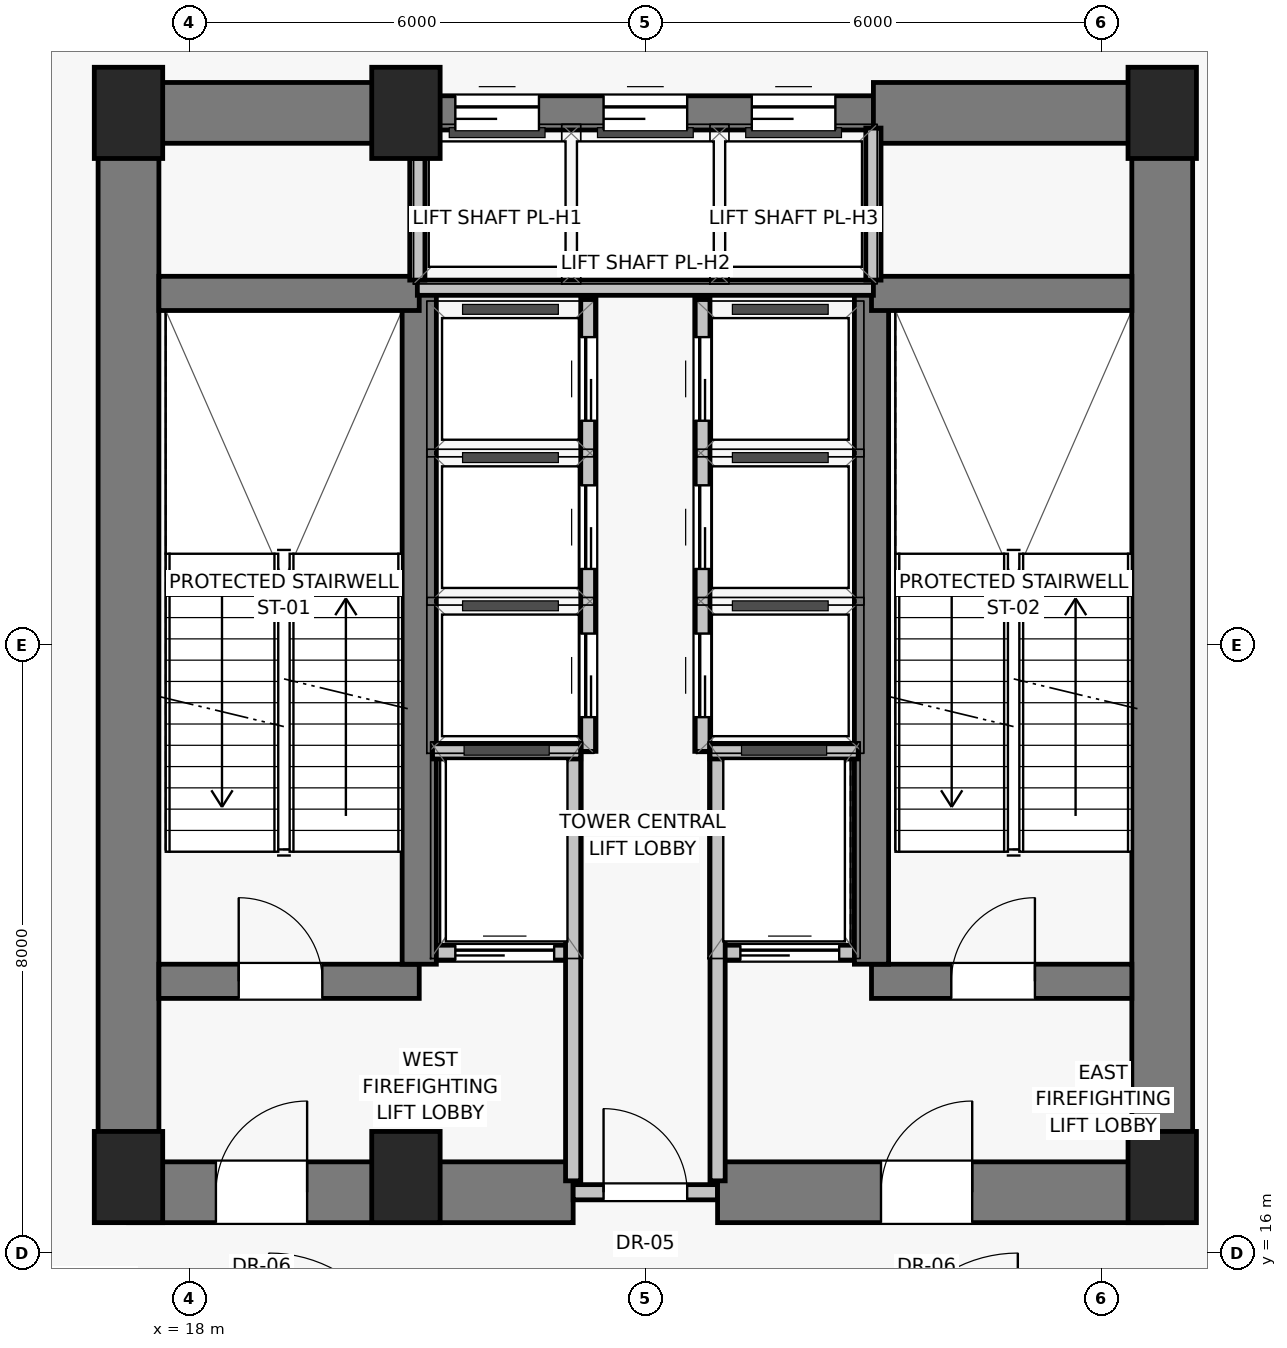
"""IFC4 building model, lengths in metres.
Left out: names, types, materials, properties, quantities, classifications, styles, units other than length and angle.
Written with IfcOpenShell. Run it as: python <this file> out.ifc"""

import sys

from ifc_helpers import new_model, si_unit, direction, frame, frame_2d, origin, origin_2d, place, context, subcontext, project, spatial, rectangle, extrude, source, transform, mapped, element, fill, save


model = new_model("IFC4")
c1 = context("Model", 3, precision=1e-05, world=origin(), true_north=direction((0.0, 1.0)))
c2 = subcontext(c1, "Body", "Model", "MODEL_VIEW")
j1 = project(units=[si_unit("LENGTHUNIT", "METRE"), si_unit("PLANEANGLEUNIT", "RADIAN")], contexts=[c1])
p1 = place(None, origin())
s1 = spatial("IfcSite", under=j1, at=p1, CompositionType="ELEMENT")
p2 = place(p1, origin())
s2 = spatial("IfcBuilding", under=s1, at=p2, CompositionType="ELEMENT")
p3 = place(p2, origin())
s3 = spatial("IfcBuildingStorey", under=s2, at=p3, CompositionType="ELEMENT", Elevation=0.0)
for number, where, z_axis, x_axis in (
    (1, (17.2, 17.0, 0.0), (0.0, 0.0, 1.0), (1.0, 0.0, 0.0)),
    (2, (20.85, 17.0, 0.0), (0.0, 0.0, 1.0), (1.0, 0.0, 0.0)),
    (3, (30.8, 17.0, 0.0), (0.0, 0.0, 1.0), (1.0, 0.0, 0.0)),
    (4, (17.2, 31.0, 0.0), (0.0, 0.0, 1.0), (1.0, 0.0, 0.0)),
    (5, (20.85, 31.0, 0.0), (0.0, 0.0, 1.0), (1.0, 0.0, 0.0)),
    (6, (30.8, 31.0, 0.0), (0.0, 0.0, 1.0), (1.0, 0.0, 0.0)),
):
    element("IfcColumn", number, at=place(p3, frame(where, z_axis=z_axis, x_axis=x_axis)), inside=s3, PredefinedType="PILASTER", context=c2, shape_type="SweptSolid", body=[
        extrude(rectangle(XDim=0.9, YDim=1.2, at=origin_2d()), origin(), (0.0, 0.0, 1.0), 5.2),
    ])
for number, where, z_axis, x_axis in (
    (7, (17.2, 16.8, 0.0), (0.0, 0.0, 1.0), (0.0, 1.0, 0.0)),
    (8, (30.8, 16.8, 0.0), (0.0, 0.0, 1.0), (0.0, 1.0, 0.0)),
):
    element("IfcWall", number, at=place(p3, frame(where, z_axis=z_axis, x_axis=x_axis)), inside=s3, PredefinedType="SHEAR", context=c2, shape_type="SweptSolid", body=[
        extrude(rectangle(XDim=14.2, YDim=0.8, at=frame_2d((7.1, 0.0))), origin(), (0.0, 0.0, 1.0), 4.9),
    ])
p4 = place(p3, frame((17.2, 16.8, 0.0), z_axis=(0.0, 0.0, 1.0), x_axis=(1.0, 0.0, 0.0)))
e9 = element("IfcWall", 9, at=p4, inside=s3, PredefinedType="SHEAR", context=c2, shape_type="SweptSolid", body=[
    extrude(rectangle(XDim=5.85, YDim=0.8, at=frame_2d((2.925, 0.0))), origin(), (0.0, 0.0, 1.0), 4.9),
])
p5 = place(p4, frame((1.15, 0.0, 0.0)))
e10 = element("IfcOpeningElement", 10, at=p5, cuts=e9, PredefinedType="OPENING", context=c2, shape_type="SweptSolid", body=[
    extrude(rectangle(XDim=1.2, YDim=2.03, at=frame_2d((0.6, 1.015))), frame((0.0, 0.41, 0.0), z_axis=(0.0, -1.0, 0.0), x_axis=(1.0, 0.0, 0.0)), (0.0, 0.0, 1.0), 0.82),
])
p6 = place(p3, frame((23.05, 16.8, 0.0), z_axis=(0.0, 0.0, 1.0), x_axis=(1.0, 0.0, 0.0)))
e11 = element("IfcWall", 11, at=p6, inside=s3, PredefinedType="SOLIDWALL", context=c2, shape_type="SweptSolid", body=[
    extrude(rectangle(XDim=1.9, YDim=0.2, at=frame_2d((0.95, 0.0))), origin(), (0.0, 0.0, 1.0), 4.05),
])
p7 = place(p6, frame((0.4, 0.0, 0.0)))
e12 = element("IfcOpeningElement", 12, at=p7, cuts=e11, PredefinedType="OPENING", context=c2, shape_type="SweptSolid", body=[
    extrude(rectangle(XDim=1.1, YDim=2.03, at=frame_2d((0.55, 1.015))), frame((0.0, 0.11, 0.0), z_axis=(0.0, -1.0, 0.0), x_axis=(1.0, 0.0, 0.0)), (0.0, 0.0, 1.0), 0.22),
])
p8 = place(p3, frame((24.95, 16.8, 0.0), z_axis=(0.0, 0.0, 1.0), x_axis=(1.0, 0.0, 0.0)))
e13 = element("IfcWall", 13, at=p8, inside=s3, PredefinedType="SHEAR", context=c2, shape_type="SweptSolid", body=[
    extrude(rectangle(XDim=5.85, YDim=0.8, at=frame_2d((2.925, 0.0))), origin(), (0.0, 0.0, 1.0), 4.9),
])
p9 = place(p8, frame((2.15, 0.0, 0.0)))
e14 = element("IfcOpeningElement", 14, at=p9, cuts=e13, PredefinedType="OPENING", context=c2, shape_type="SweptSolid", body=[
    extrude(rectangle(XDim=1.2, YDim=2.03, at=frame_2d((0.6, 1.015))), frame((0.0, 0.41, 0.0), z_axis=(0.0, -1.0, 0.0), x_axis=(1.0, 0.0, 0.0)), (0.0, 0.0, 1.0), 0.82),
])
p10 = place(p3, frame((17.2, 31.0, 0.0), z_axis=(0.0, 0.0, 1.0), x_axis=(1.0, 0.0, 0.0)))
e15 = element("IfcWall", 15, at=p10, inside=s3, PredefinedType="SHEAR", context=c2, shape_type="SweptSolid", body=[
    extrude(rectangle(XDim=3.8, YDim=0.8, at=frame_2d((1.9, 0.0))), origin(), (0.0, 0.0, 1.0), 4.9),
])
p11 = place(p3, frame((21.0, 31.0, 0.0), z_axis=(0.0, 0.0, 1.0), x_axis=(1.0, 0.0, 0.0)))
e16 = element("IfcWall", 16, at=p11, inside=s3, PredefinedType="SHEAR", context=c2, shape_type="SweptSolid", body=[
    extrude(rectangle(XDim=6.0, YDim=0.45, at=frame_2d((3.0, 0.0))), origin(), (0.0, 0.0, 1.0), 4.9),
])
p12 = place(p11, frame((0.5, 0.0, 0.0)))
e17 = element("IfcOpeningElement", 17, at=p12, cuts=e16, PredefinedType="OPENING", context=c2, shape_type="SweptSolid", body=[
    extrude(rectangle(XDim=1.1, YDim=2.08, at=frame_2d((0.55, 1.04))), frame((0.0, 0.235, 0.0), z_axis=(0.0, -1.0, 0.0), x_axis=(1.0, 0.0, 0.0)), (0.0, 0.0, 1.0), 0.47),
])
p13 = place(p11, frame((2.45, 0.0, 0.0)))
e18 = element("IfcOpeningElement", 18, at=p13, cuts=e16, PredefinedType="OPENING", context=c2, shape_type="SweptSolid", body=[
    extrude(rectangle(XDim=1.1, YDim=2.08, at=frame_2d((0.55, 1.04))), frame((0.0, 0.235, 0.0), z_axis=(0.0, -1.0, 0.0), x_axis=(1.0, 0.0, 0.0)), (0.0, 0.0, 1.0), 0.47),
])
p14 = place(p11, frame((4.4, 0.0, 0.0)))
e19 = element("IfcOpeningElement", 19, at=p14, cuts=e16, PredefinedType="OPENING", context=c2, shape_type="SweptSolid", body=[
    extrude(rectangle(XDim=1.1, YDim=2.08, at=frame_2d((0.55, 1.04))), frame((0.0, 0.235, 0.0), z_axis=(0.0, -1.0, 0.0), x_axis=(1.0, 0.0, 0.0)), (0.0, 0.0, 1.0), 0.47),
])
p15 = place(p3, frame((27.0, 31.0, 0.0), z_axis=(0.0, 0.0, 1.0), x_axis=(1.0, 0.0, 0.0)))
e20 = element("IfcWall", 20, at=p15, inside=s3, PredefinedType="SHEAR", context=c2, shape_type="SweptSolid", body=[
    extrude(rectangle(XDim=3.8, YDim=0.8, at=frame_2d((1.9, 0.0))), origin(), (0.0, 0.0, 1.0), 4.9),
])
p16 = place(p3, frame((17.6, 19.575, 0.0), z_axis=(0.0, 0.0, 1.0), x_axis=(1.0, 0.0, 0.0)))
e21 = element("IfcWall", 21, at=p16, inside=s3, PredefinedType="SHEAR", context=c2, shape_type="SweptSolid", body=[
    extrude(rectangle(XDim=3.425, YDim=0.45, at=frame_2d((1.712, 0.0))), origin(), (0.0, 0.0, 1.0), 4.9),
])
p17 = place(p16, frame((1.05, 0.0, 0.0)))
e22 = element("IfcOpeningElement", 22, at=p17, cuts=e21, PredefinedType="OPENING", context=c2, shape_type="SweptSolid", body=[
    extrude(rectangle(XDim=1.1, YDim=2.03, at=frame_2d((0.55, 1.015))), frame((0.0, 0.235, 0.0), z_axis=(0.0, -1.0, 0.0), x_axis=(1.0, 0.0, 0.0)), (0.0, 0.0, 1.0), 0.47),
])
p18 = place(p3, frame((21.2, 19.95, 0.0), z_axis=(0.0, 0.0, 1.0), x_axis=(1.0, 0.0, 0.0)))
e23 = element("IfcWall", 23, at=p18, inside=s3, PredefinedType="SOLIDWALL", context=c2, shape_type="SweptSolid", body=[
    extrude(rectangle(XDim=1.85, YDim=0.2, at=frame_2d((0.925, 0.0))), origin(), (0.0, 0.0, 1.0), 4.9),
])
p19 = place(p18, frame((0.3, 0.0, 0.0)))
e24 = element("IfcOpeningElement", 24, at=p19, cuts=e23, PredefinedType="OPENING", context=c2, shape_type="SweptSolid", body=[
    extrude(rectangle(XDim=1.3, YDim=2.25, at=frame_2d((0.65, 1.125))), frame((0.0, 0.11, 0.0), z_axis=(0.0, -1.0, 0.0), x_axis=(1.0, 0.0, 0.0)), (0.0, 0.0, 1.0), 0.22),
])
p20 = place(p3, frame((24.95, 19.95, 0.0), z_axis=(0.0, 0.0, 1.0), x_axis=(1.0, 0.0, 0.0)))
e25 = element("IfcWall", 25, at=p20, inside=s3, PredefinedType="SOLIDWALL", context=c2, shape_type="SweptSolid", body=[
    extrude(rectangle(XDim=1.85, YDim=0.2, at=frame_2d((0.925, 0.0))), origin(), (0.0, 0.0, 1.0), 4.9),
])
p21 = place(p20, frame((0.3, 0.0, 0.0)))
e26 = element("IfcOpeningElement", 26, at=p21, cuts=e25, PredefinedType="OPENING", context=c2, shape_type="SweptSolid", body=[
    extrude(rectangle(XDim=1.3, YDim=2.25, at=frame_2d((0.65, 1.125))), frame((0.0, 0.11, 0.0), z_axis=(0.0, -1.0, 0.0), x_axis=(1.0, 0.0, 0.0)), (0.0, 0.0, 1.0), 0.22),
])
p22 = place(p3, frame((26.975, 19.575, 0.0), z_axis=(0.0, 0.0, 1.0), x_axis=(1.0, 0.0, 0.0)))
e27 = element("IfcWall", 27, at=p22, inside=s3, PredefinedType="SHEAR", context=c2, shape_type="SweptSolid", body=[
    extrude(rectangle(XDim=3.425, YDim=0.45, at=frame_2d((1.712, 0.0))), origin(), (0.0, 0.0, 1.0), 4.9),
])
p23 = place(p22, frame((1.05, 0.0, 0.0)))
e28 = element("IfcOpeningElement", 28, at=p23, cuts=e27, PredefinedType="OPENING", context=c2, shape_type="SweptSolid", body=[
    extrude(rectangle(XDim=1.1, YDim=2.03, at=frame_2d((0.55, 1.015))), frame((0.0, 0.235, 0.0), z_axis=(0.0, -1.0, 0.0), x_axis=(1.0, 0.0, 0.0)), (0.0, 0.0, 1.0), 0.47),
])
for number, where, z_axis, x_axis in (
    (29, (21.025, 19.8, 0.0), (0.0, 0.0, 1.0), (0.0, 1.0, 0.0)),
    (30, (26.975, 19.8, 0.0), (0.0, 0.0, 1.0), (0.0, 1.0, 0.0)),
):
    element("IfcWall", number, at=place(p3, frame(where, z_axis=z_axis, x_axis=x_axis)), inside=s3, PredefinedType="SHEAR", context=c2, shape_type="SweptSolid", body=[
        extrude(rectangle(XDim=8.825, YDim=0.45, at=frame_2d((4.413, 0.0))), origin(), (0.0, 0.0, 1.0), 4.9),
    ])
for number, where, z_axis, x_axis in (
    (31, (17.6, 28.625, 0.0), (0.0, 0.0, 1.0), (1.0, 0.0, 0.0)),
    (32, (26.975, 28.625, 0.0), (0.0, 0.0, 1.0), (1.0, 0.0, 0.0)),
):
    element("IfcWall", number, at=place(p3, frame(where, z_axis=z_axis, x_axis=x_axis)), inside=s3, PredefinedType="SHEAR", context=c2, shape_type="SweptSolid", body=[
        extrude(rectangle(XDim=3.425, YDim=0.45, at=frame_2d((1.712, 0.0))), origin(), (0.0, 0.0, 1.0), 4.9),
    ])
for number, where, z_axis, x_axis in (
    (33, (23.05, 16.95, 0.0), (0.0, 0.0, 1.0), (0.0, 1.0, 0.0)),
    (34, (24.95, 16.95, 0.0), (0.0, 0.0, 1.0), (0.0, 1.0, 0.0)),
):
    element("IfcWall", number, at=place(p3, frame(where, z_axis=z_axis, x_axis=x_axis)), inside=s3, PredefinedType="SOLIDWALL", context=c2, shape_type="SweptSolid", body=[
        extrude(rectangle(XDim=5.6, YDim=0.2, at=frame_2d((2.8, 0.0))), origin(), (0.0, 0.0, 1.0), 4.9),
    ])
for number, where, z_axis, x_axis in (
    (35, (21.2, 22.6, 0.0), (0.0, 0.0, 1.0), (1.0, 0.0, 0.0)),
    (36, (24.85, 22.6, 0.0), (0.0, 0.0, 1.0), (1.0, 0.0, 0.0)),
):
    element("IfcWall", number, at=place(p3, frame(where, z_axis=z_axis, x_axis=x_axis)), inside=s3, PredefinedType="SOLIDWALL", context=c2, shape_type="SweptSolid", body=[
        extrude(rectangle(XDim=1.95, YDim=0.2, at=frame_2d((0.975, 0.0))), origin(), (0.0, 0.0, 1.0), 4.9),
    ])
p24 = place(p3, frame((21.0, 28.7, 0.0), z_axis=(0.0, 0.0, 1.0), x_axis=(1.0, 0.0, 0.0)))
e37 = element("IfcWall", 37, at=p24, inside=s3, PredefinedType="SOLIDWALL", context=c2, shape_type="SweptSolid", body=[
    extrude(rectangle(XDim=6.0, YDim=0.2, at=frame_2d((3.0, 0.0))), origin(), (0.0, 0.0, 1.0), 4.9),
])
p25 = place(p3, frame((21.0, 28.8, 0.0), z_axis=(0.0, 0.0, 1.0), x_axis=(0.0, 1.0, 0.0)))
e38 = element("IfcWall", 38, at=p25, inside=s3, PredefinedType="SOLIDWALL", context=c2, shape_type="SweptSolid", body=[
    extrude(rectangle(XDim=1.6, YDim=0.2, at=frame_2d((0.8, 0.0))), origin(), (0.0, 0.0, 1.0), 4.9),
])
p26 = place(p3, frame((27.0, 28.8, 0.0), z_axis=(0.0, 0.0, 1.0), x_axis=(0.0, 1.0, 0.0)))
e39 = element("IfcWall", 39, at=p26, inside=s3, PredefinedType="SOLIDWALL", context=c2, shape_type="SweptSolid", body=[
    extrude(rectangle(XDim=2.0, YDim=0.2, at=frame_2d((1.0, 0.0))), origin(), (0.0, 0.0, 1.0), 4.9),
])
p27 = place(p3, frame((23.25, 22.6, 0.0), z_axis=(0.0, 0.0, 1.0), x_axis=(0.0, 1.0, 0.0)))
e40 = element("IfcWall", 40, at=p27, inside=s3, PredefinedType="SOLIDWALL", context=c2, shape_type="SweptSolid", body=[
    extrude(rectangle(XDim=5.95, YDim=0.2, at=frame_2d((2.975, 0.0))), origin(), (0.0, 0.0, 1.0), 4.9),
])
p28 = place(p27, frame((0.45, 0.0, 0.0)))
e41 = element("IfcOpeningElement", 41, at=p28, cuts=e40, PredefinedType="OPENING", context=c2, shape_type="SweptSolid", body=[
    extrude(rectangle(XDim=1.1, YDim=2.08, at=frame_2d((0.55, 1.04))), frame((0.0, 0.11, 0.0), z_axis=(0.0, -1.0, 0.0), x_axis=(1.0, 0.0, 0.0)), (0.0, 0.0, 1.0), 0.22),
])
p29 = place(p27, frame((2.4, 0.0, 0.0)))
e42 = element("IfcOpeningElement", 42, at=p29, cuts=e40, PredefinedType="OPENING", context=c2, shape_type="SweptSolid", body=[
    extrude(rectangle(XDim=1.1, YDim=2.08, at=frame_2d((0.55, 1.04))), frame((0.0, 0.11, 0.0), z_axis=(0.0, -1.0, 0.0), x_axis=(1.0, 0.0, 0.0)), (0.0, 0.0, 1.0), 0.22),
])
p30 = place(p27, frame((4.35, 0.0, 0.0)))
e43 = element("IfcOpeningElement", 43, at=p30, cuts=e40, PredefinedType="OPENING", context=c2, shape_type="SweptSolid", body=[
    extrude(rectangle(XDim=1.1, YDim=2.08, at=frame_2d((0.55, 1.04))), frame((0.0, 0.11, 0.0), z_axis=(0.0, -1.0, 0.0), x_axis=(1.0, 0.0, 0.0)), (0.0, 0.0, 1.0), 0.22),
])
p31 = place(p3, frame((24.75, 22.6, 0.0), z_axis=(0.0, 0.0, 1.0), x_axis=(0.0, 1.0, 0.0)))
e44 = element("IfcWall", 44, at=p31, inside=s3, PredefinedType="SOLIDWALL", context=c2, shape_type="SweptSolid", body=[
    extrude(rectangle(XDim=5.95, YDim=0.2, at=frame_2d((2.975, 0.0))), origin(), (0.0, 0.0, 1.0), 4.9),
])
p32 = place(p31, frame((0.45, 0.0, 0.0)))
e45 = element("IfcOpeningElement", 45, at=p32, cuts=e44, PredefinedType="OPENING", context=c2, shape_type="SweptSolid", body=[
    extrude(rectangle(XDim=1.1, YDim=2.08, at=frame_2d((0.55, 1.04))), frame((0.0, 0.11, 0.0), z_axis=(0.0, -1.0, 0.0), x_axis=(1.0, 0.0, 0.0)), (0.0, 0.0, 1.0), 0.22),
])
p33 = place(p31, frame((2.4, 0.0, 0.0)))
e46 = element("IfcOpeningElement", 46, at=p33, cuts=e44, PredefinedType="OPENING", context=c2, shape_type="SweptSolid", body=[
    extrude(rectangle(XDim=1.1, YDim=2.08, at=frame_2d((0.55, 1.04))), frame((0.0, 0.11, 0.0), z_axis=(0.0, -1.0, 0.0), x_axis=(1.0, 0.0, 0.0)), (0.0, 0.0, 1.0), 0.22),
])
p34 = place(p31, frame((4.35, 0.0, 0.0)))
e47 = element("IfcOpeningElement", 47, at=p34, cuts=e44, PredefinedType="OPENING", context=c2, shape_type="SweptSolid", body=[
    extrude(rectangle(XDim=1.1, YDim=2.08, at=frame_2d((0.55, 1.04))), frame((0.0, 0.11, 0.0), z_axis=(0.0, -1.0, 0.0), x_axis=(1.0, 0.0, 0.0)), (0.0, 0.0, 1.0), 0.22),
])
m1 = source(origin(), c2, "Body", "SweptSolid", [
    extrude(rectangle(XDim=1.2, YDim=2.03, at=frame_2d((0.6, 1.015))), frame((0.0, 0.025, 0.0), z_axis=(0.0, -1.0, 0.0), x_axis=(1.0, 0.0, 0.0)), (0.0, 0.0, 1.0), 0.05),
])
p35 = place(p5, origin())
e48 = element("IfcDoor", 48, at=p35, inside=s3, OperationType="SINGLE_SWING_RIGHT", PredefinedType="DOOR", context=c2, shape_type="MappedRepresentation", body=[
    mapped(m1, transform((0.0, 0.0, 0.0), scale=1.0)),
])
fill(e10, e48)
m2 = source(origin(), c2, "Body", "SweptSolid", [
    extrude(rectangle(XDim=1.1, YDim=2.03, at=frame_2d((0.55, 1.015))), frame((0.0, 0.025, 0.0), z_axis=(0.0, -1.0, 0.0), x_axis=(1.0, 0.0, 0.0)), (0.0, 0.0, 1.0), 0.05),
])
p36 = place(p7, origin())
e49 = element("IfcDoor", 49, at=p36, inside=s3, OperationType="SINGLE_SWING_LEFT", PredefinedType="DOOR", context=c2, shape_type="MappedRepresentation", body=[
    mapped(m2, transform((0.0, 0.0, 0.0), scale=1.0)),
])
fill(e12, e49)
p37 = place(p9, origin())
e50 = element("IfcDoor", 50, at=p37, inside=s3, OperationType="SINGLE_SWING_RIGHT", PredefinedType="DOOR", context=c2, shape_type="MappedRepresentation", body=[
    mapped(m1, transform((0.0, 0.0, 0.0), scale=1.0)),
])
fill(e14, e50)
m3 = source(origin(), c2, "Body", "SweptSolid", [
    extrude(rectangle(XDim=1.1, YDim=2.08, at=frame_2d((0.55, 1.04))), frame((0.0, 0.025, 0.0), z_axis=(0.0, -1.0, 0.0), x_axis=(1.0, 0.0, 0.0)), (0.0, 0.0, 1.0), 0.05),
])
p38 = place(p12, origin())
e51 = element("IfcDoor", 51, at=p38, inside=s3, OperationType="SLIDING_TO_LEFT", PredefinedType="DOOR", context=c2, shape_type="MappedRepresentation", body=[
    mapped(m3, transform((0.0, 0.0, 0.0), scale=1.0)),
])
fill(e17, e51)
p39 = place(p13, origin())
e52 = element("IfcDoor", 52, at=p39, inside=s3, OperationType="SLIDING_TO_LEFT", PredefinedType="DOOR", context=c2, shape_type="MappedRepresentation", body=[
    mapped(m3, transform((0.0, 0.0, 0.0), scale=1.0)),
])
fill(e18, e52)
p40 = place(p14, origin())
e53 = element("IfcDoor", 53, at=p40, inside=s3, OperationType="SLIDING_TO_LEFT", PredefinedType="DOOR", context=c2, shape_type="MappedRepresentation", body=[
    mapped(m3, transform((0.0, 0.0, 0.0), scale=1.0)),
])
fill(e19, e53)
p41 = place(p17, origin())
e54 = element("IfcDoor", 54, at=p41, inside=s3, OperationType="SINGLE_SWING_LEFT", PredefinedType="DOOR", context=c2, shape_type="MappedRepresentation", body=[
    mapped(m2, transform((0.0, 0.0, 0.0), scale=1.0)),
])
fill(e22, e54)
m4 = source(origin(), c2, "Body", "SweptSolid", [
    extrude(rectangle(XDim=1.3, YDim=2.25, at=frame_2d((0.65, 1.125))), frame((0.0, 0.025, 0.0), z_axis=(0.0, -1.0, 0.0), x_axis=(1.0, 0.0, 0.0)), (0.0, 0.0, 1.0), 0.05),
])
p42 = place(p19, origin())
e55 = element("IfcDoor", 55, at=p42, inside=s3, OperationType="SLIDING_TO_LEFT", PredefinedType="DOOR", context=c2, shape_type="MappedRepresentation", body=[
    mapped(m4, transform((0.0, 0.0, 0.0), scale=1.0)),
])
fill(e24, e55)
p43 = place(p21, origin())
e56 = element("IfcDoor", 56, at=p43, inside=s3, OperationType="SLIDING_TO_LEFT", PredefinedType="DOOR", context=c2, shape_type="MappedRepresentation", body=[
    mapped(m4, transform((0.0, 0.0, 0.0), scale=1.0)),
])
fill(e26, e56)
p44 = place(p23, origin())
e57 = element("IfcDoor", 57, at=p44, inside=s3, OperationType="SINGLE_SWING_RIGHT", PredefinedType="DOOR", context=c2, shape_type="MappedRepresentation", body=[
    mapped(m2, transform((0.0, 0.0, 0.0), scale=1.0)),
])
fill(e28, e57)
p45 = place(p28, origin())
e58 = element("IfcDoor", 58, at=p45, inside=s3, OperationType="SLIDING_TO_LEFT", PredefinedType="DOOR", context=c2, shape_type="MappedRepresentation", body=[
    mapped(m3, transform((0.0, 0.0, 0.0), scale=1.0)),
])
fill(e41, e58)
p46 = place(p29, origin())
e59 = element("IfcDoor", 59, at=p46, inside=s3, OperationType="SLIDING_TO_LEFT", PredefinedType="DOOR", context=c2, shape_type="MappedRepresentation", body=[
    mapped(m3, transform((0.0, 0.0, 0.0), scale=1.0)),
])
fill(e42, e59)
p47 = place(p30, origin())
e60 = element("IfcDoor", 60, at=p47, inside=s3, OperationType="SLIDING_TO_LEFT", PredefinedType="DOOR", context=c2, shape_type="MappedRepresentation", body=[
    mapped(m3, transform((0.0, 0.0, 0.0), scale=1.0)),
])
fill(e43, e60)
p48 = place(p32, origin())
e61 = element("IfcDoor", 61, at=p48, inside=s3, OperationType="SLIDING_TO_LEFT", PredefinedType="DOOR", context=c2, shape_type="MappedRepresentation", body=[
    mapped(m3, transform((0.0, 0.0, 0.0), scale=1.0)),
])
fill(e45, e61)
p49 = place(p33, origin())
e62 = element("IfcDoor", 62, at=p49, inside=s3, OperationType="SLIDING_TO_LEFT", PredefinedType="DOOR", context=c2, shape_type="MappedRepresentation", body=[
    mapped(m3, transform((0.0, 0.0, 0.0), scale=1.0)),
])
fill(e46, e62)
p50 = place(p34, origin())
e63 = element("IfcDoor", 63, at=p50, inside=s3, OperationType="SLIDING_TO_LEFT", PredefinedType="DOOR", context=c2, shape_type="MappedRepresentation", body=[
    mapped(m3, transform((0.0, 0.0, 0.0), scale=1.0)),
])
fill(e47, e63)
save(model, sys.argv[1])
